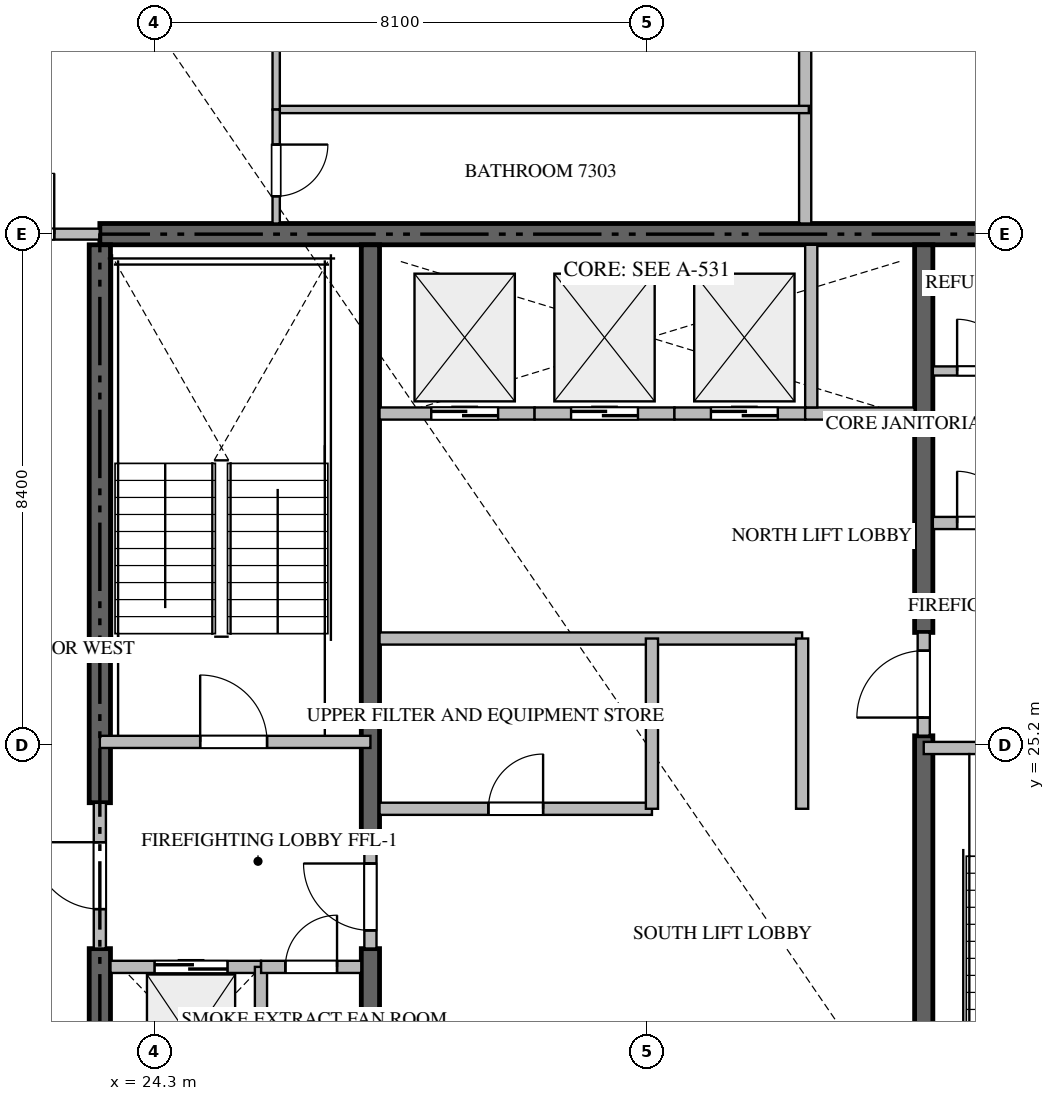
"""IFC4 building model, lengths in metres.
Left out: names, types, materials, properties, quantities, classifications, styles, units other than length and angle.
Written with IfcOpenShell. Run it as: python <this file> out.ifc"""

import sys

from ifc_helpers import new_model, si_unit, direction, frame, frame_2d, origin, place, context, subcontext, project, spatial, rectangle, extrude, source, transform, mapped, element, fill, save


model = new_model("IFC4")
c1 = context("Model", 3, precision=1e-05, world=origin(), true_north=direction((0.0, 1.0)))
c2 = subcontext(c1, "Body", "Model", "MODEL_VIEW")
j1 = project(units=[si_unit("LENGTHUNIT", "METRE"), si_unit("PLANEANGLEUNIT", "RADIAN")], contexts=[c1])
p1 = place(None, origin())
s1 = spatial("IfcSite", under=j1, at=p1, CompositionType="ELEMENT")
p2 = place(p1, origin())
s2 = spatial("IfcBuilding", under=s1, at=p2, CompositionType="ELEMENT")
p3 = place(p2, frame((0.0, 0.0, 293.45)))
s3 = spatial("IfcBuildingStorey", under=s2, at=p3, CompositionType="ELEMENT", Elevation=293.45)
p4 = place(p3, frame((41.4, 33.6, -0.26), z_axis=(0.0, 0.0, 1.0), x_axis=(-1.0, 0.0, 0.0)))
e1 = element("IfcWall", 1, at=p4, inside=s3, PredefinedType="SHEAR", context=c2, shape_type="SweptSolid", body=[
    extrude(rectangle(XDim=18.0, YDim=0.35, at=frame_2d((9.0, 0.0))), origin(), (0.0, 0.0, 1.0), 4.048),
])
p5 = place(p3, frame((23.4, 16.975, -0.26), z_axis=(0.0, 0.0, 1.0), x_axis=(0.0, 1.0, 0.0)))
e2 = element("IfcWall", 2, at=p5, inside=s3, PredefinedType="SHEAR", context=c2, shape_type="SweptSolid", body=[
    extrude(rectangle(XDim=4.875, YDim=0.35, at=frame_2d((2.438, 0.0))), origin(), (0.0, 0.0, 1.0), 4.048),
])
p6 = place(p3, frame((23.4, 24.25, -0.26), z_axis=(0.0, 0.0, 1.0), x_axis=(0.0, 1.0, 0.0)))
e3 = element("IfcWall", 3, at=p6, inside=s3, PredefinedType="SHEAR", context=c2, shape_type="SweptSolid", body=[
    extrude(rectangle(XDim=9.175, YDim=0.35, at=frame_2d((4.587, 0.0))), origin(), (0.0, 0.0, 1.0), 4.048),
])
p7 = place(p3, frame((27.85, 16.975, -0.26), z_axis=(0.0, 0.0, 1.0), x_axis=(0.0, 1.0, 0.0)))
e4 = element("IfcWall", 4, at=p7, inside=s3, PredefinedType="SHEAR", context=c2, shape_type="SweptSolid", body=[
    extrude(rectangle(XDim=4.875, YDim=0.3, at=frame_2d((2.438, 0.0))), origin(), (0.0, 0.0, 1.0), 4.048),
])
p8 = place(p3, frame((27.85, 23.55, -0.26), z_axis=(0.0, 0.0, 1.0), x_axis=(0.0, 1.0, 0.0)))
e5 = element("IfcWall", 5, at=p8, inside=s3, PredefinedType="SHEAR", context=c2, shape_type="SweptSolid", body=[
    extrude(rectangle(XDim=9.875, YDim=0.3, at=frame_2d((4.938, 0.0))), origin(), (0.0, 0.0, 1.0), 4.048),
])
p9 = place(p3, frame((36.95, 16.975, -0.26), z_axis=(0.0, 0.0, 1.0), x_axis=(0.0, 1.0, 0.0)))
e6 = element("IfcWall", 6, at=p9, inside=s3, PredefinedType="SHEAR", context=c2, shape_type="SweptSolid", body=[
    extrude(rectangle(XDim=8.375, YDim=0.3, at=frame_2d((4.188, 0.0))), origin(), (0.0, 0.0, 1.0), 4.048),
])
p10 = place(p3, frame((36.95, 27.05, -0.26), z_axis=(0.0, 0.0, 1.0), x_axis=(0.0, 1.0, 0.0)))
e7 = element("IfcWall", 7, at=p10, inside=s3, PredefinedType="SHEAR", context=c2, shape_type="SweptSolid", body=[
    extrude(rectangle(XDim=6.375, YDim=0.3, at=frame_2d((3.188, 0.0))), origin(), (0.0, 0.0, 1.0), 4.048),
])
p11 = place(p3, frame((23.4, 25.25, 0.0), z_axis=(0.0, 0.0, 1.0), x_axis=(1.0, 0.0, 0.0)))
e8 = element("IfcWall", 8, at=p11, inside=s3, PredefinedType="STANDARD", context=c2, shape_type="SweptSolid", body=[
    extrude(rectangle(XDim=4.45, YDim=0.2, at=frame_2d((2.225, 0.0))), origin(), (0.0, 0.0, 1.0), 3.79),
])
p12 = place(p11, frame((1.65, 0.0, 0.0)))
e9 = element("IfcOpeningElement", 9, at=p12, cuts=e8, PredefinedType="OPENING", context=c2, shape_type="SweptSolid", body=[
    extrude(rectangle(XDim=1.1, YDim=2.15, at=frame_2d((0.55, 1.075))), frame((0.0, 0.11, 0.0), z_axis=(0.0, -1.0, 0.0), x_axis=(1.0, 0.0, 0.0)), (0.0, 0.0, 1.0), 0.22),
])
p13 = place(p3, frame((36.95, 25.15, 0.0), z_axis=(0.0, 0.0, 1.0), x_axis=(1.0, 0.0, 0.0)))
e10 = element("IfcWall", 10, at=p13, inside=s3, PredefinedType="STANDARD", context=c2, shape_type="SweptSolid", body=[
    extrude(rectangle(XDim=4.45, YDim=0.2, at=frame_2d((2.225, 0.0))), origin(), (0.0, 0.0, 1.0), 3.79),
])
p14 = place(p13, frame((1.65, 0.0, 0.0)))
e11 = element("IfcOpeningElement", 11, at=p14, cuts=e10, PredefinedType="OPENING", context=c2, shape_type="SweptSolid", body=[
    extrude(rectangle(XDim=1.1, YDim=2.15, at=frame_2d((0.55, 1.075))), frame((0.0, 0.11, 0.0), z_axis=(0.0, -1.0, 0.0), x_axis=(1.0, 0.0, 0.0)), (0.0, 0.0, 1.0), 0.22),
])
p15 = place(p3, frame((23.575, 21.55, 0.0), z_axis=(0.0, 0.0, 1.0), x_axis=(1.0, 0.0, 0.0)))
e12 = element("IfcWall", 12, at=p15, inside=s3, PredefinedType="STANDARD", context=c2, shape_type="SweptSolid", body=[
    extrude(rectangle(XDim=2.475, YDim=0.2, at=frame_2d((1.238, 0.0))), origin(), (0.0, 0.0, 1.0), 3.79),
])
p16 = place(p15, frame((0.725, 0.0, 0.0)))
e13 = element("IfcOpeningElement", 13, at=p16, cuts=e12, PredefinedType="OPENING", context=c2, shape_type="SweptSolid", body=[
    extrude(rectangle(XDim=1.2, YDim=2.2, at=frame_2d((0.6, 1.1))), frame((0.0, 0.11, 0.0), z_axis=(0.0, -1.0, 0.0), x_axis=(1.0, 0.0, 0.0)), (0.0, 0.0, 1.0), 0.22),
])
p17 = place(p3, frame((28.0, 30.65, 0.0), z_axis=(0.0, 0.0, 1.0), x_axis=(1.0, 0.0, 0.0)))
e14 = element("IfcWall", 14, at=p17, inside=s3, PredefinedType="STANDARD", context=c2, shape_type="SweptSolid", body=[
    extrude(rectangle(XDim=2.55, YDim=0.2, at=frame_2d((1.275, 0.0))), origin(), (0.0, 0.0, 1.0), 3.79),
])
p18 = place(p17, frame((0.85, 0.0, 0.0)))
e15 = element("IfcOpeningElement", 15, at=p18, cuts=e14, PredefinedType="OPENING", context=c2, shape_type="SweptSolid", body=[
    extrude(rectangle(XDim=1.1, YDim=2.2, at=frame_2d((0.55, 1.1))), frame((0.0, 0.11, 0.0), z_axis=(0.0, -1.0, 0.0), x_axis=(1.0, 0.0, 0.0)), (0.0, 0.0, 1.0), 0.22),
])
p19 = place(p3, frame((30.55, 30.65, 0.0), z_axis=(0.0, 0.0, 1.0), x_axis=(1.0, 0.0, 0.0)))
e16 = element("IfcWall", 16, at=p19, inside=s3, PredefinedType="STANDARD", context=c2, shape_type="SweptSolid", body=[
    extrude(rectangle(XDim=2.3, YDim=0.2, at=frame_2d((1.15, 0.0))), origin(), (0.0, 0.0, 1.0), 3.79),
])
p20 = place(p19, frame((0.6, 0.0, 0.0)))
e17 = element("IfcOpeningElement", 17, at=p20, cuts=e16, PredefinedType="OPENING", context=c2, shape_type="SweptSolid", body=[
    extrude(rectangle(XDim=1.1, YDim=2.2, at=frame_2d((0.55, 1.1))), frame((0.0, 0.11, 0.0), z_axis=(0.0, -1.0, 0.0), x_axis=(1.0, 0.0, 0.0)), (0.0, 0.0, 1.0), 0.22),
])
p21 = place(p3, frame((32.85, 30.65, 0.0), z_axis=(0.0, 0.0, 1.0), x_axis=(1.0, 0.0, 0.0)))
e18 = element("IfcWall", 18, at=p21, inside=s3, PredefinedType="STANDARD", context=c2, shape_type="SweptSolid", body=[
    extrude(rectangle(XDim=2.15, YDim=0.2, at=frame_2d((1.075, 0.0))), origin(), (0.0, 0.0, 1.0), 3.79),
])
p22 = place(p21, frame((0.6, 0.0, 0.0)))
e19 = element("IfcOpeningElement", 19, at=p22, cuts=e18, PredefinedType="OPENING", context=c2, shape_type="SweptSolid", body=[
    extrude(rectangle(XDim=1.1, YDim=2.2, at=frame_2d((0.55, 1.1))), frame((0.0, 0.11, 0.0), z_axis=(0.0, -1.0, 0.0), x_axis=(1.0, 0.0, 0.0)), (0.0, 0.0, 1.0), 0.22),
])
p23 = place(p3, frame((35.0, 30.65, 0.0), z_axis=(0.0, 0.0, 1.0), x_axis=(1.0, 0.0, 0.0)))
e20 = element("IfcWall", 20, at=p23, inside=s3, PredefinedType="STANDARD", context=c2, shape_type="SweptSolid", body=[
    extrude(rectangle(XDim=1.8, YDim=0.2, at=frame_2d((0.9, 0.0))), origin(), (0.0, 0.0, 1.0), 3.79),
])
p24 = place(p3, frame((35.1, 30.75, 0.0), z_axis=(0.0, 0.0, 1.0), x_axis=(0.0, 1.0, 0.0)))
e21 = element("IfcWall", 21, at=p24, inside=s3, PredefinedType="STANDARD", context=c2, shape_type="SweptSolid", body=[
    extrude(rectangle(XDim=2.675, YDim=0.2, at=frame_2d((1.337, 0.0))), origin(), (0.0, 0.0, 1.0), 3.79),
])
p25 = place(p3, frame((26.05, 19.05, 0.0), z_axis=(0.0, 0.0, 1.0), x_axis=(0.0, 1.0, 0.0)))
e22 = element("IfcWall", 22, at=p25, inside=s3, PredefinedType="STANDARD", context=c2, shape_type="SweptSolid", body=[
    extrude(rectangle(XDim=2.5, YDim=0.2, at=frame_2d((1.25, 0.0))), origin(), (0.0, 0.0, 1.0), 3.79),
])
p26 = place(p3, frame((26.052, 21.55, 0.0), z_axis=(0.0, 0.0, 1.0), x_axis=(1.0, 0.0, 0.0)))
e23 = element("IfcWall", 23, at=p26, inside=s3, PredefinedType="STANDARD", context=c2, shape_type="SweptSolid", body=[
    extrude(rectangle(XDim=1.648, YDim=0.2, at=frame_2d((0.824, 0.0))), origin(), (0.0, 0.0, 1.0), 3.79),
])
p27 = place(p26, frame((0.399, 0.0, 0.0)))
e24 = element("IfcOpeningElement", 24, at=p27, cuts=e23, PredefinedType="OPENING", context=c2, shape_type="SweptSolid", body=[
    extrude(rectangle(XDim=0.85, YDim=2.1, at=frame_2d((0.425, 1.05))), frame((0.0, 0.11, 0.0), z_axis=(0.0, -1.0, 0.0), x_axis=(1.0, 0.0, 0.0)), (0.0, 0.0, 1.0), 0.22),
])
p28 = place(p3, frame((37.1, 28.85, 0.0), z_axis=(0.0, 0.0, 1.0), x_axis=(1.0, 0.0, 0.0)))
e25 = element("IfcWall", 25, at=p28, inside=s3, PredefinedType="STANDARD", context=c2, shape_type="SweptSolid", body=[
    extrude(rectangle(XDim=1.648, YDim=0.2, at=frame_2d((0.824, 0.0))), origin(), (0.0, 0.0, 1.0), 3.79),
])
p29 = place(p28, frame((0.399, 0.0, 0.0)))
e26 = element("IfcOpeningElement", 26, at=p29, cuts=e25, PredefinedType="OPENING", context=c2, shape_type="SweptSolid", body=[
    extrude(rectangle(XDim=0.85, YDim=2.1, at=frame_2d((0.425, 1.05))), frame((0.0, 0.11, 0.0), z_axis=(0.0, -1.0, 0.0), x_axis=(1.0, 0.0, 0.0)), (0.0, 0.0, 1.0), 0.22),
])
p30 = place(p3, frame((23.4, 21.852, 0.0), z_axis=(0.0, 0.0, 1.0), x_axis=(0.0, 1.0, 0.0)))
e27 = element("IfcWall", 27, at=p30, inside=s3, PredefinedType="STANDARD", context=c2, shape_type="SweptSolid", body=[
    extrude(rectangle(XDim=2.396, YDim=0.2, at=frame_2d((1.198, 0.0))), origin(), (0.0, 0.0, 1.0), 3.79),
])
p31 = place(p30, frame((0.648, 0.0, 0.0)))
e28 = element("IfcOpeningElement", 28, at=p31, cuts=e27, PredefinedType="OPENING", context=c2, shape_type="SweptSolid", body=[
    extrude(rectangle(XDim=1.1, YDim=2.15, at=frame_2d((0.55, 1.075))), frame((0.0, 0.11, 0.0), z_axis=(0.0, -1.0, 0.0), x_axis=(1.0, 0.0, 0.0)), (0.0, 0.0, 1.0), 0.22),
])
p32 = place(p3, frame((27.85, 21.852, 0.0), z_axis=(0.0, 0.0, 1.0), x_axis=(0.0, 1.0, 0.0)))
e29 = element("IfcWall", 29, at=p32, inside=s3, PredefinedType="STANDARD", context=c2, shape_type="SweptSolid", body=[
    extrude(rectangle(XDim=1.696, YDim=0.2, at=frame_2d((0.848, 0.0))), origin(), (0.0, 0.0, 1.0), 3.79),
])
p33 = place(p32, frame((0.298, 0.0, 0.0)))
e30 = element("IfcOpeningElement", 30, at=p33, cuts=e29, PredefinedType="OPENING", context=c2, shape_type="SweptSolid", body=[
    extrude(rectangle(XDim=1.1, YDim=2.15, at=frame_2d((0.55, 1.075))), frame((0.0, 0.11, 0.0), z_axis=(0.0, -1.0, 0.0), x_axis=(1.0, 0.0, 0.0)), (0.0, 0.0, 1.0), 0.22),
])
p34 = place(p3, frame((36.95, 25.352, 0.0), z_axis=(0.0, 0.0, 1.0), x_axis=(0.0, 1.0, 0.0)))
e31 = element("IfcWall", 31, at=p34, inside=s3, PredefinedType="STANDARD", context=c2, shape_type="SweptSolid", body=[
    extrude(rectangle(XDim=1.696, YDim=0.2, at=frame_2d((0.848, 0.0))), origin(), (0.0, 0.0, 1.0), 3.79),
])
p35 = place(p34, frame((0.298, 0.0, 0.0)))
e32 = element("IfcOpeningElement", 32, at=p35, cuts=e31, PredefinedType="OPENING", context=c2, shape_type="SweptSolid", body=[
    extrude(rectangle(XDim=1.1, YDim=2.15, at=frame_2d((0.55, 1.075))), frame((0.0, 0.11, 0.0), z_axis=(0.0, -1.0, 0.0), x_axis=(1.0, 0.0, 0.0)), (0.0, 0.0, 1.0), 0.22),
])
p36 = place(p3, frame((37.1, 31.35, 0.0), z_axis=(0.0, 0.0, 1.0), x_axis=(1.0, 0.0, 0.0)))
e33 = element("IfcWall", 33, at=p36, inside=s3, PredefinedType="PARTITIONING", context=c2, shape_type="SweptSolid", body=[
    extrude(rectangle(XDim=1.648, YDim=0.15, at=frame_2d((0.824, 0.0))), origin(), (0.0, 0.0, 1.0), 3.79),
])
p37 = place(p36, frame((0.399, 0.0, 0.0)))
e34 = element("IfcOpeningElement", 34, at=p37, cuts=e33, PredefinedType="OPENING", context=c2, shape_type="SweptSolid", body=[
    extrude(rectangle(XDim=0.85, YDim=2.1, at=frame_2d((0.425, 1.05))), frame((0.0, 0.085, 0.0), z_axis=(0.0, -1.0, 0.0), x_axis=(1.0, 0.0, 0.0)), (0.0, 0.0, 1.0), 0.17),
])
p38 = place(p3, frame((28.0, 26.95, 0.0), z_axis=(0.0, 0.0, 1.0), x_axis=(1.0, 0.0, 0.0)))
e35 = element("IfcWall", 35, at=p38, inside=s3, PredefinedType="STANDARD", context=c2, shape_type="SweptSolid", body=[
    extrude(rectangle(XDim=6.95, YDim=0.2, at=frame_2d((3.475, 0.0))), origin(), (0.0, 0.0, 1.0), 3.79),
])
p39 = place(p3, frame((34.95, 24.15, 0.0), z_axis=(0.0, 0.0, 1.0), x_axis=(0.0, 1.0, 0.0)))
e36 = element("IfcWall", 36, at=p39, inside=s3, PredefinedType="STANDARD", context=c2, shape_type="SweptSolid", body=[
    extrude(rectangle(XDim=2.8, YDim=0.2, at=frame_2d((1.4, 0.0))), origin(), (0.0, 0.0, 1.0), 3.79),
])
p40 = place(p3, frame((28.0, 24.15, 0.0), z_axis=(0.0, 0.0, 1.0), x_axis=(1.0, 0.0, 0.0)))
e37 = element("IfcWall", 37, at=p40, inside=s3, PredefinedType="STANDARD", context=c2, shape_type="SweptSolid", body=[
    extrude(rectangle(XDim=4.48, YDim=0.2, at=frame_2d((2.24, 0.0))), origin(), (0.0, 0.0, 1.0), 3.79),
])
p41 = place(p40, frame((1.79, 0.0, 0.0)))
e38 = element("IfcOpeningElement", 38, at=p41, cuts=e37, PredefinedType="OPENING", context=c2, shape_type="SweptSolid", body=[
    extrude(rectangle(XDim=0.9, YDim=2.1, at=frame_2d((0.45, 1.05))), frame((0.0, 0.11, 0.0), z_axis=(0.0, -1.0, 0.0), x_axis=(1.0, 0.0, 0.0)), (0.0, 0.0, 1.0), 0.22),
])
p42 = place(p3, frame((32.48, 24.15, 0.0), z_axis=(0.0, 0.0, 1.0), x_axis=(0.0, 1.0, 0.0)))
e39 = element("IfcWall", 39, at=p42, inside=s3, PredefinedType="STANDARD", context=c2, shape_type="SweptSolid", body=[
    extrude(rectangle(XDim=2.8, YDim=0.2, at=frame_2d((1.4, 0.0))), origin(), (0.0, 0.0, 1.0), 3.79),
])
p43 = place(p3, frame((35.0, 33.775, 0.0), z_axis=(0.0, 0.0, 1.0), x_axis=(0.0, 1.0, 0.0)))
e40 = element("IfcWall", 40, at=p43, inside=s3, PredefinedType="PARTITIONING", context=c2, shape_type="SweptSolid", body=[
    extrude(rectangle(XDim=14.143, YDim=0.2, at=frame_2d((7.072, 0.0))), origin(), (0.0, 0.0, 1.0), 3.79),
])
p44 = place(p3, frame((20.902, 33.6, 0.0), z_axis=(0.0, 0.0, 1.0), x_axis=(1.0, 0.0, 0.0)))
e41 = element("IfcWall", 41, at=p44, inside=s3, PredefinedType="PARTITIONING", context=c2, shape_type="SweptSolid", body=[
    extrude(rectangle(XDim=2.496, YDim=0.18, at=frame_2d((1.248, 0.0))), origin(), (0.0, 0.0, 1.0), 3.79),
])
p45 = place(p44, frame((0.748, 0.0, 0.0)))
e42 = element("IfcOpeningElement", 42, at=p45, cuts=e41, PredefinedType="OPENING", context=c2, shape_type="SweptSolid", body=[
    extrude(rectangle(XDim=1.0, YDim=2.15, at=frame_2d((0.5, 1.075))), frame((0.0, 0.1, 0.0), z_axis=(0.0, -1.0, 0.0), x_axis=(1.0, 0.0, 0.0)), (0.0, 0.0, 1.0), 0.2),
])
p46 = place(p3, frame((26.3, 35.65, 0.0), z_axis=(0.0, 0.0, 1.0), x_axis=(1.0, 0.0, 0.0)))
e43 = element("IfcWall", 43, at=p46, inside=s3, PredefinedType="PARTITIONING", context=c2, shape_type="SweptSolid", body=[
    extrude(rectangle(XDim=8.76, YDim=0.12, at=frame_2d((4.38, 0.0))), origin(), (0.0, 0.0, 1.0), 3.79),
])
p47 = place(p3, frame((26.3, 44.036, 0.0), z_axis=(0.0, 0.0, 1.0), x_axis=(0.0, -1.0, 0.0)))
e44 = element("IfcWall", 44, at=p47, inside=s3, PredefinedType="PARTITIONING", context=c2, shape_type="SweptSolid", body=[
    extrude(rectangle(XDim=8.386, YDim=0.12, at=frame_2d((4.193, 0.0))), origin(), (0.0, 0.0, 1.0), 3.79),
])
p48 = place(p47, frame((3.768, 0.0, 0.0)))
e45 = element("IfcOpeningElement", 45, at=p48, cuts=e44, PredefinedType="OPENING", context=c2, shape_type="SweptSolid", body=[
    extrude(rectangle(XDim=0.85, YDim=2.1, at=frame_2d((0.425, 1.05))), frame((0.0, 0.07, 0.0), z_axis=(0.0, -1.0, 0.0), x_axis=(1.0, 0.0, 0.0)), (0.0, 0.0, 1.0), 0.14),
])
p49 = place(p3, frame((26.3, 35.648, 0.0), z_axis=(0.0, 0.0, 1.0), x_axis=(0.0, -1.0, 0.0)))
e46 = element("IfcWall", 46, at=p49, inside=s3, PredefinedType="PARTITIONING", context=c2, shape_type="SweptSolid", body=[
    extrude(rectangle(XDim=1.873, YDim=0.12, at=frame_2d((0.937, 0.0))), origin(), (0.0, 0.0, 1.0), 3.79),
])
p50 = place(p49, frame((0.575, 0.0, 0.0)))
e47 = element("IfcOpeningElement", 47, at=p50, cuts=e46, PredefinedType="OPENING", context=c2, shape_type="SweptSolid", body=[
    extrude(rectangle(XDim=0.85, YDim=2.1, at=frame_2d((0.425, 1.05))), frame((0.0, 0.07, 0.0), z_axis=(0.0, -1.0, 0.0), x_axis=(1.0, 0.0, 0.0)), (0.0, 0.0, 1.0), 0.14),
])
m1 = source(origin(), c2, "Body", "SweptSolid", [
    extrude(rectangle(XDim=1.1, YDim=2.15, at=frame_2d((0.55, 1.075))), frame((0.0, 0.025, 0.0), z_axis=(0.0, -1.0, 0.0), x_axis=(1.0, 0.0, 0.0)), (0.0, 0.0, 1.0), 0.05),
])
p51 = place(p12, origin())
e48 = element("IfcDoor", 48, at=p51, inside=s3, OperationType="SINGLE_SWING_LEFT", PredefinedType="DOOR", context=c2, shape_type="MappedRepresentation", body=[
    mapped(m1, transform((0.0, 0.0, 0.0), scale=1.0)),
])
fill(e9, e48)
m2 = source(origin(), c2, "Body", "SweptSolid", [
    extrude(rectangle(XDim=1.2, YDim=2.2, at=frame_2d((0.6, 1.1))), frame((0.0, 0.025, 0.0), z_axis=(0.0, -1.0, 0.0), x_axis=(1.0, 0.0, 0.0)), (0.0, 0.0, 1.0), 0.05),
])
p52 = place(p16, origin())
e49 = element("IfcDoor", 49, at=p52, inside=s3, OperationType="DOUBLE_DOOR_SLIDING", PredefinedType="DOOR", context=c2, shape_type="MappedRepresentation", body=[
    mapped(m2, transform((0.0, 0.0, 0.0), scale=1.0)),
])
fill(e13, e49)
m3 = source(origin(), c2, "Body", "SweptSolid", [
    extrude(rectangle(XDim=1.1, YDim=2.2, at=frame_2d((0.55, 1.1))), frame((0.0, 0.025, 0.0), z_axis=(0.0, -1.0, 0.0), x_axis=(1.0, 0.0, 0.0)), (0.0, 0.0, 1.0), 0.05),
])
p53 = place(p18, origin())
e50 = element("IfcDoor", 50, at=p53, inside=s3, OperationType="DOUBLE_DOOR_SLIDING", PredefinedType="DOOR", context=c2, shape_type="MappedRepresentation", body=[
    mapped(m3, transform((0.0, 0.0, 0.0), scale=1.0)),
])
fill(e15, e50)
p54 = place(p20, origin())
e51 = element("IfcDoor", 51, at=p54, inside=s3, OperationType="DOUBLE_DOOR_SLIDING", PredefinedType="DOOR", context=c2, shape_type="MappedRepresentation", body=[
    mapped(m3, transform((0.0, 0.0, 0.0), scale=1.0)),
])
fill(e17, e51)
p55 = place(p22, origin())
e52 = element("IfcDoor", 52, at=p55, inside=s3, OperationType="DOUBLE_DOOR_SLIDING", PredefinedType="DOOR", context=c2, shape_type="MappedRepresentation", body=[
    mapped(m3, transform((0.0, 0.0, 0.0), scale=1.0)),
])
fill(e19, e52)
m4 = source(origin(), c2, "Body", "SweptSolid", [
    extrude(rectangle(XDim=0.85, YDim=2.1, at=frame_2d((0.425, 1.05))), frame((0.0, 0.025, 0.0), z_axis=(0.0, -1.0, 0.0), x_axis=(1.0, 0.0, 0.0)), (0.0, 0.0, 1.0), 0.05),
])
p56 = place(p27, origin())
e53 = element("IfcDoor", 53, at=p56, inside=s3, OperationType="SINGLE_SWING_RIGHT", PredefinedType="DOOR", context=c2, shape_type="MappedRepresentation", body=[
    mapped(m4, transform((0.0, 0.0, 0.0), scale=1.0)),
])
fill(e24, e53)
p57 = place(p29, origin())
e54 = element("IfcDoor", 54, at=p57, inside=s3, OperationType="SINGLE_SWING_LEFT", PredefinedType="DOOR", context=c2, shape_type="MappedRepresentation", body=[
    mapped(m4, transform((0.0, 0.0, 0.0), scale=1.0)),
])
fill(e26, e54)
p58 = place(p31, origin())
e55 = element("IfcDoor", 55, at=p58, inside=s3, OperationType="SINGLE_SWING_RIGHT", PredefinedType="DOOR", context=c2, shape_type="MappedRepresentation", body=[
    mapped(m1, transform((0.0, 0.0, 0.0), scale=1.0)),
])
fill(e28, e55)
p59 = place(p33, origin())
e56 = element("IfcDoor", 56, at=p59, inside=s3, OperationType="SINGLE_SWING_RIGHT", PredefinedType="DOOR", context=c2, shape_type="MappedRepresentation", body=[
    mapped(m1, transform((0.0, 0.0, 0.0), scale=1.0)),
])
fill(e30, e56)
p60 = place(p35, origin())
e57 = element("IfcDoor", 57, at=p60, inside=s3, OperationType="SINGLE_SWING_LEFT", PredefinedType="DOOR", context=c2, shape_type="MappedRepresentation", body=[
    mapped(m1, transform((0.0, 0.0, 0.0), scale=1.0)),
])
fill(e32, e57)
p61 = place(p37, origin())
e58 = element("IfcDoor", 58, at=p61, inside=s3, OperationType="SINGLE_SWING_LEFT", PredefinedType="DOOR", context=c2, shape_type="MappedRepresentation", body=[
    mapped(m4, transform((0.0, 0.0, 0.0), scale=1.0)),
])
fill(e34, e58)
m5 = source(origin(), c2, "Body", "SweptSolid", [
    extrude(rectangle(XDim=0.9, YDim=2.1, at=frame_2d((0.45, 1.05))), frame((0.0, 0.025, 0.0), z_axis=(0.0, -1.0, 0.0), x_axis=(1.0, 0.0, 0.0)), (0.0, 0.0, 1.0), 0.05),
])
p62 = place(p41, origin())
e59 = element("IfcDoor", 59, at=p62, inside=s3, OperationType="SINGLE_SWING_RIGHT", PredefinedType="DOOR", context=c2, shape_type="MappedRepresentation", body=[
    mapped(m5, transform((0.0, 0.0, 0.0), scale=1.0)),
])
fill(e38, e59)
m6 = source(origin(), c2, "Body", "SweptSolid", [
    extrude(rectangle(XDim=1.0, YDim=2.15, at=frame_2d((0.5, 1.075))), frame((0.0, 0.025, 0.0), z_axis=(0.0, -1.0, 0.0), x_axis=(1.0, 0.0, 0.0)), (0.0, 0.0, 1.0), 0.05),
])
p63 = place(p45, origin())
e60 = element("IfcDoor", 60, at=p63, inside=s3, OperationType="SINGLE_SWING_RIGHT", PredefinedType="DOOR", context=c2, shape_type="MappedRepresentation", body=[
    mapped(m6, transform((0.0, 0.0, 0.0), scale=1.0)),
])
fill(e42, e60)
p64 = place(p50, origin())
e61 = element("IfcDoor", 61, at=p64, inside=s3, OperationType="SINGLE_SWING_LEFT", PredefinedType="DOOR", context=c2, shape_type="MappedRepresentation", body=[
    mapped(m4, transform((0.0, 0.0, 0.0), scale=1.0)),
])
fill(e47, e61)
save(model, sys.argv[1])
